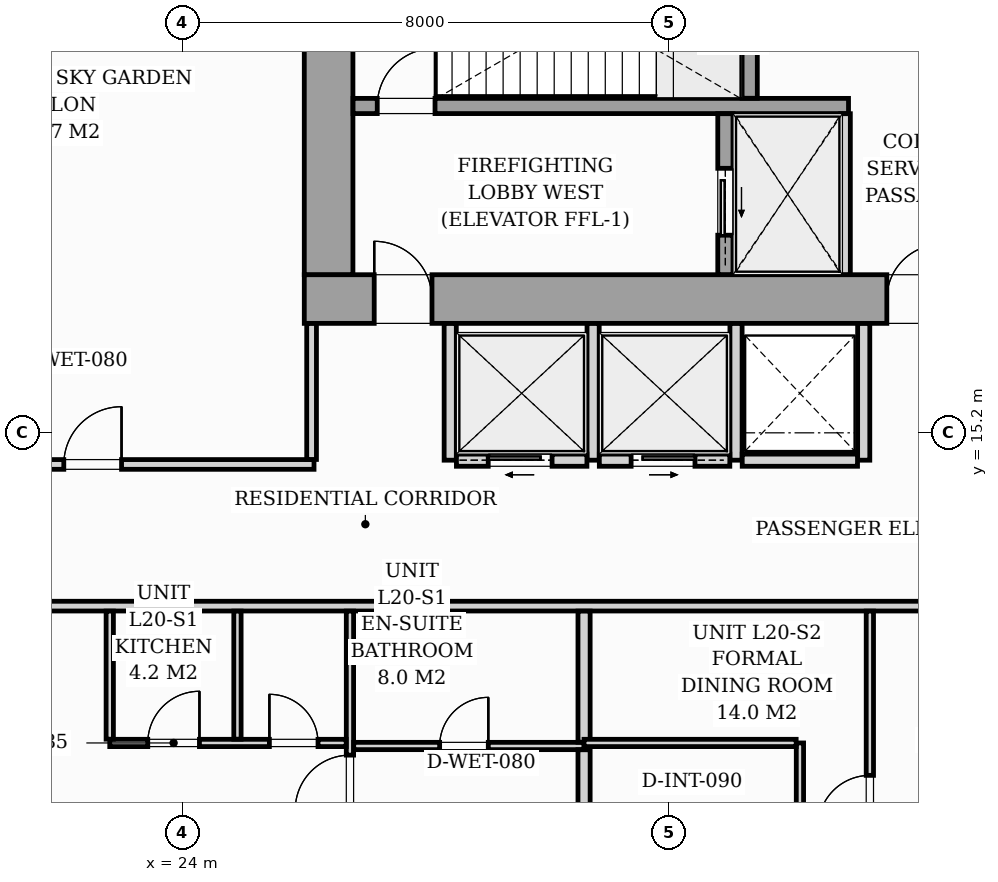
"""IFC4 building model, lengths in metres.
Left out: names, types, materials, properties, quantities, classifications, styles, units other than length and angle.
Written with IfcOpenShell. Run it as: python <this file> out.ifc"""

import sys

from ifc_helpers import new_model, si_unit, direction, frame, frame_2d, origin, origin_2d, place, context, subcontext, project, spatial, rectangle, i_section, extrude, source, transform, mapped, element, fill, save


model = new_model("IFC4")
c1 = context("Model", 3, precision=1e-05, world=origin(), true_north=direction((0.0, 1.0)))
c2 = subcontext(c1, "Body", "Model", "MODEL_VIEW")
j1 = project(units=[si_unit("LENGTHUNIT", "METRE"), si_unit("PLANEANGLEUNIT", "RADIAN")], contexts=[c1])
p1 = place(None, origin())
s1 = spatial("IfcSite", under=j1, at=p1, CompositionType="ELEMENT")
p2 = place(p1, origin())
s2 = spatial("IfcBuilding", under=s1, at=p2, CompositionType="ELEMENT")
p3 = place(p2, frame((0.0, 0.0, 72.6)))
s3 = spatial("IfcBuildingStorey", under=s2, at=p3, CompositionType="ELEMENT", Elevation=72.6)
m1 = source(origin(), c2, "Body", "SweptSolid", [
    extrude(i_section(OverallWidth=0.427, OverallDepth=0.483, WebThickness=0.051, FlangeThickness=0.082, FilletRadius=0.018, at=origin_2d()), origin(), (0.0, 0.0, 1.0), 5.196),
])
for number, where, z_axis, x_axis in (
    (1, (26.4, 17.4, 0.002), (0.0, 0.0, 1.0), (1.0, 0.0, 0.0)),
    (2, (33.12, 17.4, 0.002), (0.0, 0.0, 1.0), (1.0, 0.0, 0.0)),
):
    element("IfcColumn", number, at=place(p3, frame(where, z_axis=z_axis, x_axis=x_axis)), inside=s3, PredefinedType="PILASTER", context=c2, shape_type="MappedRepresentation", body=[
        mapped(m1, transform((0.0, 0.0, 0.0), scale=1.0)),
    ])
p4 = place(p3, frame((26.0, 17.4, 0.0), z_axis=(0.0, 0.0, 1.0), x_axis=(1.0, 0.0, 0.0)))
e3 = element("IfcWall", 3, at=p4, inside=s3, PredefinedType="SHEAR", context=c2, shape_type="SweptSolid", body=[
    extrude(rectangle(XDim=20.0, YDim=0.8, at=frame_2d((10.0, 0.0))), origin(), (0.0, 0.0, 1.0), 5.2),
])
p5 = place(p4, frame((1.15, 0.0, 0.0)))
e4 = element("IfcOpeningElement", 4, at=p5, cuts=e3, PredefinedType="OPENING", context=c2, shape_type="SweptSolid", body=[
    extrude(rectangle(XDim=0.95, YDim=2.06, at=frame_2d((0.475, 1.03))), frame((0.0, 0.41, 0.0), z_axis=(0.0, -1.0, 0.0), x_axis=(1.0, 0.0, 0.0)), (0.0, 0.0, 1.0), 0.82),
])
p6 = place(p4, frame((9.58, 0.0, 0.0)))
e5 = element("IfcOpeningElement", 5, at=p6, cuts=e3, PredefinedType="OPENING", context=c2, shape_type="SweptSolid", body=[
    extrude(rectangle(XDim=0.9, YDim=2.06, at=frame_2d((0.45, 1.03))), frame((0.0, 0.41, 0.0), z_axis=(0.0, -1.0, 0.0), x_axis=(1.0, 0.0, 0.0)), (0.0, 0.0, 1.0), 0.82),
])
p7 = place(p4, frame((17.75, 0.0, 0.0)))
e6 = element("IfcOpeningElement", 6, at=p7, cuts=e3, PredefinedType="OPENING", context=c2, shape_type="SweptSolid", body=[
    extrude(rectangle(XDim=0.95, YDim=2.06, at=frame_2d((0.475, 1.03))), frame((0.0, 0.41, 0.0), z_axis=(0.0, -1.0, 0.0), x_axis=(1.0, 0.0, 0.0)), (0.0, 0.0, 1.0), 0.82),
])
p8 = place(p3, frame((26.4, 17.802, 0.0), z_axis=(0.0, 0.0, 1.0), x_axis=(0.0, 1.0, 0.0)))
e7 = element("IfcWall", 7, at=p8, inside=s3, PredefinedType="SHEAR", context=c2, shape_type="SweptSolid", body=[
    extrude(rectangle(XDim=5.796, YDim=0.8, at=frame_2d((2.898, 0.0))), origin(), (0.0, 0.0, 1.0), 5.2),
])
p9 = place(p3, frame((26.802, 20.575, 0.0), z_axis=(0.0, 0.0, 1.0), x_axis=(1.0, 0.0, 0.0)))
e8 = element("IfcWall", 8, at=p9, inside=s3, PredefinedType="SOLIDWALL", context=c2, shape_type="SweptSolid", body=[
    extrude(rectangle(XDim=8.148, YDim=0.25, at=frame_2d((4.074, 0.0))), origin(), (0.0, 0.0, 1.0), 5.2),
])
p10 = place(p9, frame((0.398, 0.0, 0.0)))
e9 = element("IfcOpeningElement", 9, at=p10, cuts=e8, PredefinedType="OPENING", context=c2, shape_type="SweptSolid", body=[
    extrude(rectangle(XDim=0.95, YDim=2.06, at=frame_2d((0.475, 1.03))), frame((0.0, 0.135, 0.0), z_axis=(0.0, -1.0, 0.0), x_axis=(1.0, 0.0, 0.0)), (0.0, 0.0, 1.0), 0.27),
])
p11 = place(p3, frame((33.325, 20.702, 0.0), z_axis=(0.0, 0.0, 1.0), x_axis=(0.0, 1.0, 0.0)))
e10 = element("IfcWall", 10, at=p11, inside=s3, PredefinedType="SOLIDWALL", context=c2, shape_type="SweptSolid", body=[
    extrude(rectangle(XDim=2.896, YDim=0.25, at=frame_2d((1.448, 0.0))), origin(), (0.0, 0.0, 1.0), 5.2),
])
p12 = place(p3, frame((32.925, 17.802, 0.0), z_axis=(0.0, 0.0, 1.0), x_axis=(0.0, 1.0, 0.0)))
e11 = element("IfcWall", 11, at=p12, inside=s3, PredefinedType="SOLIDWALL", context=c2, shape_type="SweptSolid", body=[
    extrude(rectangle(XDim=2.646, YDim=0.25, at=frame_2d((1.323, 0.0))), origin(), (0.0, 0.0, 1.0), 5.2),
])
p13 = place(p12, frame((0.648, 0.0, 0.0)))
e12 = element("IfcOpeningElement", 12, at=p13, cuts=e11, PredefinedType="OPENING", context=c2, shape_type="SweptSolid", body=[
    extrude(rectangle(XDim=1.1, YDim=2.08, at=frame_2d((0.55, 1.04))), frame((0.0, 0.135, 0.0), z_axis=(0.0, -1.0, 0.0), x_axis=(1.0, 0.0, 0.0)), (0.0, 0.0, 1.0), 0.27),
])
p14 = place(p3, frame((34.9, 17.802, 0.0), z_axis=(0.0, 0.0, 1.0), x_axis=(0.0, 1.0, 0.0)))
e13 = element("IfcWall", 13, at=p14, inside=s3, PredefinedType="PARTITIONING", context=c2, shape_type="SweptSolid", body=[
    extrude(rectangle(XDim=2.646, YDim=0.16, at=frame_2d((1.323, 0.0))), origin(), (0.0, 0.0, 1.0), 4.78),
])
for number, where, z_axis, x_axis in (
    (14, (28.4, 14.75, 0.0), (0.0, 0.0, 1.0), (0.0, 1.0, 0.0)),
    (15, (30.75, 14.75, 0.0), (0.0, 0.0, 1.0), (0.0, 1.0, 0.0)),
    (16, (33.1, 14.75, 0.0), (0.0, 0.0, 1.0), (0.0, 1.0, 0.0)),
):
    element("IfcWall", number, at=place(p3, frame(where, z_axis=z_axis, x_axis=x_axis)), inside=s3, PredefinedType="PARTITIONING", context=c2, shape_type="SweptSolid", body=[
        extrude(rectangle(XDim=2.248, YDim=0.2, at=frame_2d((1.124, 0.0))), origin(), (0.0, 0.0, 1.0), 4.78),
    ])
p15 = place(p3, frame((28.502, 14.75, 0.0), z_axis=(0.0, 0.0, 1.0), x_axis=(1.0, 0.0, 0.0)))
e17 = element("IfcWall", 17, at=p15, inside=s3, PredefinedType="PARTITIONING", context=c2, shape_type="SweptSolid", body=[
    extrude(rectangle(XDim=2.146, YDim=0.2, at=frame_2d((1.073, 0.0))), origin(), (0.0, 0.0, 1.0), 4.78),
])
p16 = place(p15, frame((0.523, 0.0, 0.0)))
e18 = element("IfcOpeningElement", 18, at=p16, cuts=e17, PredefinedType="OPENING", context=c2, shape_type="SweptSolid", body=[
    extrude(rectangle(XDim=1.05, YDim=2.08, at=frame_2d((0.525, 1.04))), frame((0.0, 0.11, 0.0), z_axis=(0.0, -1.0, 0.0), x_axis=(1.0, 0.0, 0.0)), (0.0, 0.0, 1.0), 0.22),
])
p17 = place(p3, frame((30.852, 14.75, 0.0), z_axis=(0.0, 0.0, 1.0), x_axis=(1.0, 0.0, 0.0)))
e19 = element("IfcWall", 19, at=p17, inside=s3, PredefinedType="PARTITIONING", context=c2, shape_type="SweptSolid", body=[
    extrude(rectangle(XDim=2.146, YDim=0.2, at=frame_2d((1.073, 0.0))), origin(), (0.0, 0.0, 1.0), 4.78),
])
p18 = place(p17, frame((0.523, 0.0, 0.0)))
e20 = element("IfcOpeningElement", 20, at=p18, cuts=e19, PredefinedType="OPENING", context=c2, shape_type="SweptSolid", body=[
    extrude(rectangle(XDim=1.05, YDim=2.08, at=frame_2d((0.525, 1.04))), frame((0.0, 0.11, 0.0), z_axis=(0.0, -1.0, 0.0), x_axis=(1.0, 0.0, 0.0)), (0.0, 0.0, 1.0), 0.22),
])
p19 = place(p3, frame((35.2, 14.75, 0.0), z_axis=(0.0, 0.0, 1.0), x_axis=(0.0, 1.0, 0.0)))
e21 = element("IfcWall", 21, at=p19, inside=s3, PredefinedType="PARTITIONING", context=c2, shape_type="SweptSolid", body=[
    extrude(rectangle(XDim=2.248, YDim=0.2, at=frame_2d((1.124, 0.0))), origin(), (0.0, 0.0, 1.0), 4.78),
])
p20 = place(p3, frame((33.202, 14.75, 0.0), z_axis=(0.0, 0.0, 1.0), x_axis=(1.0, 0.0, 0.0)))
e22 = element("IfcWall", 22, at=p20, inside=s3, PredefinedType="PARTITIONING", context=c2, shape_type="SweptSolid", body=[
    extrude(rectangle(XDim=1.896, YDim=0.2, at=frame_2d((0.948, 0.0))), origin(), (0.0, 0.0, 1.0), 4.78),
])
p21 = place(p3, frame((16.6, 12.35, 0.0), z_axis=(0.0, 0.0, 1.0), x_axis=(1.0, 0.0, 0.0)))
e23 = element("IfcWall", 23, at=p21, inside=s3, PredefinedType="PARTITIONING", context=c2, shape_type="SweptSolid", body=[
    extrude(rectangle(XDim=37.6, YDim=0.16, at=frame_2d((18.8, 0.0))), origin(), (0.0, 0.0, 1.0), 4.78),
])
p22 = place(p21, frame((2.665, 0.0, 0.0)))
e24 = element("IfcOpeningElement", 24, at=p22, cuts=e23, PredefinedType="OPENING", context=c2, shape_type="SweptSolid", body=[
    extrude(rectangle(XDim=0.95, YDim=2.06, at=frame_2d((0.475, 1.03))), frame((0.0, 0.09, 0.0), z_axis=(0.0, -1.0, 0.0), x_axis=(1.0, 0.0, 0.0)), (0.0, 0.0, 1.0), 0.18),
])
p23 = place(p21, frame((26.146, 0.0, 0.0)))
e25 = element("IfcOpeningElement", 25, at=p23, cuts=e23, PredefinedType="OPENING", context=c2, shape_type="SweptSolid", body=[
    extrude(rectangle(XDim=0.95, YDim=2.06, at=frame_2d((0.475, 1.03))), frame((0.0, 0.09, 0.0), z_axis=(0.0, -1.0, 0.0), x_axis=(1.0, 0.0, 0.0)), (0.0, 0.0, 1.0), 0.18),
])
p24 = place(p3, frame((26.751, 5.318, 0.0), z_axis=(0.0, 0.0, 1.0), x_axis=(0.0, 1.0, 0.0)))
e26 = element("IfcWall", 26, at=p24, inside=s3, PredefinedType="PARTITIONING", context=c2, shape_type="SweptSolid", body=[
    extrude(rectangle(XDim=6.95, YDim=0.12, at=frame_2d((3.475, 0.0))), origin(), (0.0, 0.0, 1.0), 4.055),
])
p25 = place(p24, frame((3.682, 0.0, 0.0)))
e27 = element("IfcOpeningElement", 27, at=p25, cuts=e26, PredefinedType="OPENING", context=c2, shape_type="SweptSolid", body=[
    extrude(rectangle(XDim=0.9, YDim=2.05, at=frame_2d((0.45, 1.025))), frame((0.0, 0.07, 0.0), z_axis=(0.0, -1.0, 0.0), x_axis=(1.0, 0.0, 0.0)), (0.0, 0.0, 1.0), 0.14),
])
p26 = place(p3, frame((22.801, 10.1, 0.0), z_axis=(0.0, 0.0, 1.0), x_axis=(1.0, 0.0, 0.0)))
e28 = element("IfcWall", 28, at=p26, inside=s3, PredefinedType="PARTITIONING", context=c2, shape_type="SweptSolid", body=[
    extrude(rectangle(XDim=3.888, YDim=0.12, at=frame_2d((1.944, 0.0))), origin(), (0.0, 0.0, 1.0), 4.78),
])
p27 = place(p26, frame((0.625, 0.0, 0.0)))
e29 = element("IfcOpeningElement", 29, at=p27, cuts=e28, PredefinedType="OPENING", context=c2, shape_type="SweptSolid", body=[
    extrude(rectangle(XDim=0.85, YDim=2.05, at=frame_2d((0.425, 1.025))), frame((0.0, 0.07, 0.0), z_axis=(0.0, -1.0, 0.0), x_axis=(1.0, 0.0, 0.0)), (0.0, 0.0, 1.0), 0.14),
])
p28 = place(p26, frame((2.625, 0.0, 0.0)))
e30 = element("IfcOpeningElement", 30, at=p28, cuts=e28, PredefinedType="OPENING", context=c2, shape_type="SweptSolid", body=[
    extrude(rectangle(XDim=0.8, YDim=2.02, at=frame_2d((0.4, 1.01))), frame((0.0, 0.07, 0.0), z_axis=(0.0, -1.0, 0.0), x_axis=(1.0, 0.0, 0.0)), (0.0, 0.0, 1.0), 0.14),
])
for number, where, z_axis, x_axis in (
    (31, (24.901, 10.162, 0.0), (0.0, 0.0, 1.0), (0.0, 1.0, 0.0)),
    (32, (22.801, 10.162, 0.0), (0.0, 0.0, 1.0), (0.0, 1.0, 0.0)),
):
    element("IfcWall", number, at=place(p3, frame(where, z_axis=z_axis, x_axis=x_axis)), inside=s3, PredefinedType="PARTITIONING", context=c2, shape_type="SweptSolid", body=[
        extrude(rectangle(XDim=2.106, YDim=0.12, at=frame_2d((1.053, 0.0))), origin(), (0.0, 0.0, 1.0), 4.78),
    ])
p29 = place(p3, frame((26.813, 10.05, 0.0), z_axis=(0.0, 0.0, 1.0), x_axis=(1.0, 0.0, 0.0)))
e33 = element("IfcWall", 33, at=p29, inside=s3, PredefinedType="PARTITIONING", context=c2, shape_type="SweptSolid", body=[
    extrude(rectangle(XDim=3.788, YDim=0.12, at=frame_2d((1.894, 0.0))), origin(), (0.0, 0.0, 1.0), 4.78),
])
p30 = place(p29, frame((1.413, 0.0, 0.0)))
e34 = element("IfcOpeningElement", 34, at=p30, cuts=e33, PredefinedType="OPENING", context=c2, shape_type="SweptSolid", body=[
    extrude(rectangle(XDim=0.8, YDim=2.02, at=frame_2d((0.4, 1.01))), frame((0.0, 0.07, 0.0), z_axis=(0.0, -1.0, 0.0), x_axis=(1.0, 0.0, 0.0)), (0.0, 0.0, 1.0), 0.14),
])
p31 = place(p3, frame((30.601, 5.506, 0.0), z_axis=(0.0, 0.0, 1.0), x_axis=(0.0, 1.0, 0.0)))
e35 = element("IfcWall", 35, at=p31, inside=s3, PredefinedType="PARTITIONING", context=c2, shape_type="SweptSolid", body=[
    extrude(rectangle(XDim=4.482, YDim=0.2, at=frame_2d((2.241, 0.0))), origin(), (0.0, 0.0, 1.0), 4.78),
])
p32 = place(p3, frame((30.601, 10.112, 0.0), z_axis=(0.0, 0.0, 1.0), x_axis=(0.0, 1.0, 0.0)))
e36 = element("IfcWall", 36, at=p32, inside=s3, PredefinedType="PARTITIONING", context=c2, shape_type="SweptSolid", body=[
    extrude(rectangle(XDim=2.156, YDim=0.2, at=frame_2d((1.078, 0.0))), origin(), (0.0, 0.0, 1.0), 4.78),
])
p33 = place(p3, frame((34.151, 6.031, 0.0), z_axis=(0.0, 0.0, 1.0), x_axis=(0.0, 1.0, 0.0)))
e37 = element("IfcWall", 37, at=p33, inside=s3, PredefinedType="PARTITIONING", context=c2, shape_type="SweptSolid", body=[
    extrude(rectangle(XDim=4.069, YDim=0.12, at=frame_2d((2.035, 0.0))), origin(), (0.0, 0.0, 1.0), 4.78),
])
p34 = place(p33, frame((1.342, 0.0, 0.0)))
e38 = element("IfcOpeningElement", 38, at=p34, cuts=e37, PredefinedType="OPENING", context=c2, shape_type="SweptSolid", body=[
    extrude(rectangle(XDim=0.85, YDim=2.05, at=frame_2d((0.425, 1.025))), frame((0.0, 0.07, 0.0), z_axis=(0.0, -1.0, 0.0), x_axis=(1.0, 0.0, 0.0)), (0.0, 0.0, 1.0), 0.14),
])
p35 = place(p3, frame((30.601, 10.1, 0.0), z_axis=(0.0, 0.0, 1.0), x_axis=(1.0, 0.0, 0.0)))
e39 = element("IfcWall", 39, at=p35, inside=s3, PredefinedType="PARTITIONING", context=c2, shape_type="SweptSolid", body=[
    extrude(rectangle(XDim=3.488, YDim=0.12, at=frame_2d((1.744, 0.0))), origin(), (0.0, 0.0, 1.0), 4.78),
])
p36 = place(p3, frame((35.301, 6.142, 0.0), z_axis=(0.0, 0.0, 1.0), x_axis=(0.0, 1.0, 0.0)))
e40 = element("IfcWall", 40, at=p36, inside=s3, PredefinedType="PARTITIONING", context=c2, shape_type="SweptSolid", body=[
    extrude(rectangle(XDim=6.126, YDim=0.12, at=frame_2d((3.063, 0.0))), origin(), (0.0, 0.0, 1.0), 4.78),
])
p37 = place(p36, frame((2.575, 0.0, 0.0)))
e41 = element("IfcOpeningElement", 41, at=p37, cuts=e40, PredefinedType="OPENING", context=c2, shape_type="SweptSolid", body=[
    extrude(rectangle(XDim=0.85, YDim=2.05, at=frame_2d((0.425, 1.025))), frame((0.0, 0.07, 0.0), z_axis=(0.0, -1.0, 0.0), x_axis=(1.0, 0.0, 0.0)), (0.0, 0.0, 1.0), 0.14),
])
p38 = place(p3, frame((16.682, 14.68, 0.0), z_axis=(0.0, 0.0, 1.0), x_axis=(1.0, 0.0, 0.0)))
e42 = element("IfcWall", 42, at=p38, inside=s3, PredefinedType="PARTITIONING", context=c2, shape_type="SweptSolid", body=[
    extrude(rectangle(XDim=9.478, YDim=0.16, at=frame_2d((4.739, 0.0))), origin(), (0.0, 0.0, 1.0), 4.78),
])
p39 = place(p38, frame((0.668, 0.0, 0.0)))
e43 = element("IfcOpeningElement", 43, at=p39, cuts=e42, PredefinedType="OPENING", context=c2, shape_type="SweptSolid", body=[
    extrude(rectangle(XDim=0.9, YDim=2.05, at=frame_2d((0.45, 1.025))), frame((0.0, 0.09, 0.0), z_axis=(0.0, -1.0, 0.0), x_axis=(1.0, 0.0, 0.0)), (0.0, 0.0, 1.0), 0.18),
])
p40 = place(p38, frame((5.363, 0.0, 0.0)))
e44 = element("IfcOpeningElement", 44, at=p40, cuts=e42, PredefinedType="OPENING", context=c2, shape_type="SweptSolid", body=[
    extrude(rectangle(XDim=0.95, YDim=2.06, at=frame_2d((0.475, 1.03))), frame((0.0, 0.09, 0.0), z_axis=(0.0, -1.0, 0.0), x_axis=(1.0, 0.0, 0.0)), (0.0, 0.0, 1.0), 0.18),
])
p41 = place(p3, frame((26.12, 14.762, 0.0), z_axis=(0.0, 0.0, 1.0), x_axis=(0.0, 1.0, 0.0)))
e45 = element("IfcWall", 45, at=p41, inside=s3, PredefinedType="PARTITIONING", context=c2, shape_type="SweptSolid", body=[
    extrude(rectangle(XDim=2.236, YDim=0.16, at=frame_2d((1.118, 0.0))), origin(), (0.0, 0.0, 1.0), 4.78),
])
m2 = source(origin(), c2, "Body", "SweptSolid", [
    extrude(rectangle(XDim=0.95, YDim=2.06, at=frame_2d((0.475, 1.03))), frame((0.0, 0.025, 0.0), z_axis=(0.0, -1.0, 0.0), x_axis=(1.0, 0.0, 0.0)), (0.0, 0.0, 1.0), 0.05),
])
p42 = place(p5, origin())
e46 = element("IfcDoor", 46, at=p42, inside=s3, OperationType="SINGLE_SWING_LEFT", PredefinedType="DOOR", context=c2, shape_type="MappedRepresentation", body=[
    mapped(m2, transform((0.0, 0.0, 0.0), scale=1.0)),
])
fill(e4, e46)
m3 = source(origin(), c2, "Body", "SweptSolid", [
    extrude(rectangle(XDim=0.9, YDim=2.06, at=frame_2d((0.45, 1.03))), frame((0.0, 0.025, 0.0), z_axis=(0.0, -1.0, 0.0), x_axis=(1.0, 0.0, 0.0)), (0.0, 0.0, 1.0), 0.05),
])
p43 = place(p6, origin())
e47 = element("IfcDoor", 47, at=p43, inside=s3, OperationType="SINGLE_SWING_RIGHT", PredefinedType="DOOR", context=c2, shape_type="MappedRepresentation", body=[
    mapped(m3, transform((0.0, 0.0, 0.0), scale=1.0)),
])
fill(e5, e47)
p44 = place(p10, origin())
e48 = element("IfcDoor", 48, at=p44, inside=s3, OperationType="SINGLE_SWING_RIGHT", PredefinedType="DOOR", context=c2, shape_type="MappedRepresentation", body=[
    mapped(m2, transform((0.0, 0.0, 0.0), scale=1.0)),
])
fill(e9, e48)
m4 = source(origin(), c2, "Body", "SweptSolid", [
    extrude(rectangle(XDim=1.1, YDim=2.08, at=frame_2d((0.55, 1.04))), frame((0.0, 0.025, 0.0), z_axis=(0.0, -1.0, 0.0), x_axis=(1.0, 0.0, 0.0)), (0.0, 0.0, 1.0), 0.05),
])
p45 = place(p13, origin())
e49 = element("IfcDoor", 49, at=p45, inside=s3, OperationType="SLIDING_TO_LEFT", PredefinedType="DOOR", context=c2, shape_type="MappedRepresentation", body=[
    mapped(m4, transform((0.0, 0.0, 0.0), scale=1.0)),
])
fill(e12, e49)
m5 = source(origin(), c2, "Body", "SweptSolid", [
    extrude(rectangle(XDim=1.05, YDim=2.08, at=frame_2d((0.525, 1.04))), frame((0.0, 0.025, 0.0), z_axis=(0.0, -1.0, 0.0), x_axis=(1.0, 0.0, 0.0)), (0.0, 0.0, 1.0), 0.05),
])
p46 = place(p16, origin())
e50 = element("IfcDoor", 50, at=p46, inside=s3, OperationType="SLIDING_TO_LEFT", PredefinedType="DOOR", context=c2, shape_type="MappedRepresentation", body=[
    mapped(m5, transform((0.0, 0.0, 0.0), scale=1.0)),
])
fill(e18, e50)
p47 = place(p18, origin())
e51 = element("IfcDoor", 51, at=p47, inside=s3, OperationType="SLIDING_TO_RIGHT", PredefinedType="DOOR", context=c2, shape_type="MappedRepresentation", body=[
    mapped(m5, transform((0.0, 0.0, 0.0), scale=1.0)),
])
fill(e20, e51)
m6 = source(origin(), c2, "Body", "SweptSolid", [
    extrude(rectangle(XDim=0.8, YDim=2.02, at=frame_2d((0.4, 1.01))), frame((0.0, 0.025, 0.0), z_axis=(0.0, -1.0, 0.0), x_axis=(1.0, 0.0, 0.0)), (0.0, 0.0, 1.0), 0.05),
])
p48 = place(p30, origin())
e52 = element("IfcDoor", 52, at=p48, inside=s3, OperationType="SINGLE_SWING_RIGHT", PredefinedType="DOOR", context=c2, shape_type="MappedRepresentation", body=[
    mapped(m6, transform((0.0, 0.0, 0.0), scale=1.0)),
])
fill(e34, e52)
m7 = source(origin(), c2, "Body", "SweptSolid", [
    extrude(rectangle(XDim=0.9, YDim=2.05, at=frame_2d((0.45, 1.025))), frame((0.0, 0.025, 0.0), z_axis=(0.0, -1.0, 0.0), x_axis=(1.0, 0.0, 0.0)), (0.0, 0.0, 1.0), 0.05),
])
p49 = place(p25, origin())
e53 = element("IfcDoor", 53, at=p49, inside=s3, OperationType="SINGLE_SWING_LEFT", PredefinedType="DOOR", context=c2, shape_type="MappedRepresentation", body=[
    mapped(m7, transform((0.0, 0.0, 0.0), scale=1.0)),
])
fill(e27, e53)
m8 = source(origin(), c2, "Body", "SweptSolid", [
    extrude(rectangle(XDim=0.85, YDim=2.05, at=frame_2d((0.425, 1.025))), frame((0.0, 0.025, 0.0), z_axis=(0.0, -1.0, 0.0), x_axis=(1.0, 0.0, 0.0)), (0.0, 0.0, 1.0), 0.05),
])
p50 = place(p27, origin())
e54 = element("IfcDoor", 54, at=p50, inside=s3, OperationType="SINGLE_SWING_RIGHT", PredefinedType="DOOR", context=c2, shape_type="MappedRepresentation", body=[
    mapped(m8, transform((0.0, 0.0, 0.0), scale=1.0)),
])
fill(e29, e54)
p51 = place(p28, origin())
e55 = element("IfcDoor", 55, at=p51, inside=s3, OperationType="SINGLE_SWING_LEFT", PredefinedType="DOOR", context=c2, shape_type="MappedRepresentation", body=[
    mapped(m6, transform((0.0, 0.0, 0.0), scale=1.0)),
])
fill(e30, e55)
p52 = place(p37, origin())
e56 = element("IfcDoor", 56, at=p52, inside=s3, OperationType="SINGLE_SWING_LEFT", PredefinedType="DOOR", context=c2, shape_type="MappedRepresentation", body=[
    mapped(m8, transform((0.0, 0.0, 0.0), scale=1.0)),
])
fill(e41, e56)
m9 = source(origin(), c2, "Body", "SweptSolid", [
    extrude(rectangle(XDim=0.95, YDim=2.06, at=frame_2d((0.475, 1.03))), frame((0.0, 0.025, 0.0), z_axis=(0.0, -1.0, 0.0), x_axis=(1.0, 0.0, 0.0)), (0.0, 0.0, 1.0), 0.05),
])
p53 = place(p40, origin())
e57 = element("IfcDoor", 57, at=p53, inside=s3, OperationType="SINGLE_SWING_RIGHT", PredefinedType="DOOR", context=c2, shape_type="MappedRepresentation", body=[
    mapped(m9, transform((0.0, 0.0, 0.0), scale=1.0)),
])
fill(e44, e57)
save(model, sys.argv[1])
